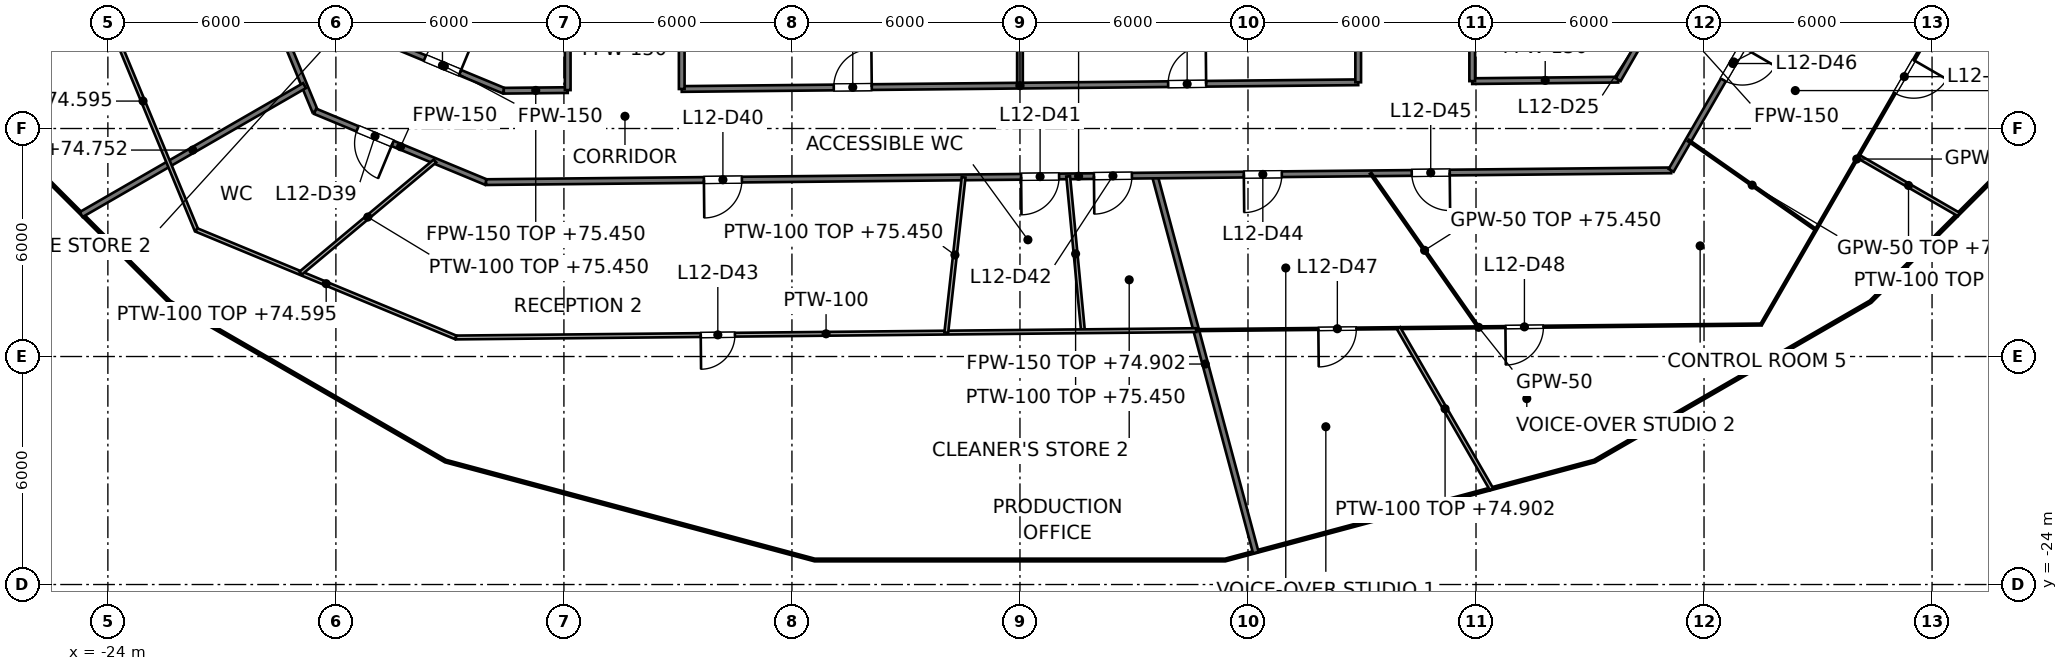
"""IFC4 building model, lengths in metres.
Left out: names, types, materials, properties, quantities, classifications, styles, units other than length and angle.
Written with IfcOpenShell. Run it as: python <this file> out.ifc"""

import sys

from ifc_helpers import new_model, si_unit, direction, frame, frame_2d, origin, place, context, subcontext, project, spatial, rectangle, extrude, element, fill, save


model = new_model("IFC4")
c1 = context("Model", 3, precision=1e-05, world=origin(), true_north=direction((0.0, 1.0)))
c2 = subcontext(c1, "Body", "Model", "MODEL_VIEW")
j1 = project(units=[si_unit("LENGTHUNIT", "METRE"), si_unit("PLANEANGLEUNIT", "RADIAN")], contexts=[c1])
p1 = place(None, origin())
s1 = spatial("IfcSite", under=j1, at=p1, CompositionType="ELEMENT")
p2 = place(p1, origin())
s2 = spatial("IfcBuilding", under=s1, at=p2, CompositionType="ELEMENT")
p3 = place(p2, frame((0.0, 0.0, 71.4)))
s3 = spatial("IfcBuildingStorey", under=s2, at=p3, CompositionType="ELEMENT", Elevation=71.4)
p4 = place(p3, frame((3.547, -13.236, 0.0), z_axis=(0.0, 0.0, 1.0), x_axis=(0.258783597602, -0.965935323721, 0.0)))
e1 = element("IfcWall", 1, at=p4, inside=s3, PredefinedType="PARTITIONING", context=c2, shape_type="SweptSolid", body=[
    extrude(rectangle(XDim=10.274, YDim=0.15, at=frame_2d((5.137, 0.0))), origin(), (0.0, 0.0, 1.0), 3.502),
])
p5 = place(p3, frame((-20.4, -7.075, 0.0), z_axis=(0.0, 0.0, 1.0), x_axis=(0.382745247328, -0.923853925492, 0.0)))
e2 = element("IfcWall", 2, at=p5, inside=s3, PredefinedType="PARTITIONING", context=c2, shape_type="SweptSolid", body=[
    extrude(rectangle(XDim=4.841, YDim=0.15, at=frame_2d((2.42, 0.0))), origin(), (0.0, 0.0, 1.0), 3.195),
])
p6 = place(p3, frame((-18.547, -11.547, 0.0), z_axis=(0.0, 0.0, 1.0), x_axis=(0.923816952651, -0.382834478587, 0.0)))
e3 = element("IfcWall", 3, at=p6, inside=s3, PredefinedType="PARTITIONING", context=c2, shape_type="SweptSolid", body=[
    extrude(rectangle(XDim=4.869, YDim=0.15, at=frame_2d((2.435, 0.0))), origin(), (0.0, 0.0, 1.0), 3.195),
])
p7 = place(p6, frame((1.207, 0.0, 0.0)))
e4 = element("IfcOpeningElement", 4, at=p7, cuts=e3, PredefinedType="OPENING", context=c2, shape_type="SweptSolid", body=[
    extrude(rectangle(XDim=1.0, YDim=2.1, at=frame_2d((0.5, 1.05))), frame((0.0, 0.075, 0.0), z_axis=(0.0, -1.0, 0.0), x_axis=(1.0, 0.0, 0.0)), (0.0, 0.0, 1.0), 0.15),
])
p8 = place(p3, frame((-16.71, -9.71, 0.0), z_axis=(0.0, 0.0, 1.0), x_axis=(0.923809320732, -0.382852894632, 0.0)))
e5 = element("IfcWall", 5, at=p8, inside=s3, PredefinedType="PARTITIONING", context=c2, shape_type="SweptSolid", body=[
    extrude(rectangle(XDim=3.385, YDim=0.15, at=frame_2d((1.692, 0.0))), origin(), (0.0, 0.0, 1.0), 3.195),
])
p9 = place(p8, frame((1.139, 0.0, 0.0)))
e6 = element("IfcOpeningElement", 6, at=p9, cuts=e5, PredefinedType="OPENING", context=c2, shape_type="SweptSolid", body=[
    extrude(rectangle(XDim=1.0, YDim=2.1, at=frame_2d((0.5, 1.05))), frame((0.0, 0.075, 0.0), z_axis=(0.0, -1.0, 0.0), x_axis=(1.0, 0.0, 0.0)), (0.0, 0.0, 1.0), 0.15),
])
p10 = place(p3, frame((-14.049, -13.411, 0.0), z_axis=(0.0, 0.0, 1.0), x_axis=(0.999950729089, 0.009926701045, 0.0)))
e7 = element("IfcWall", 7, at=p10, inside=s3, PredefinedType="PARTITIONING", context=c2, shape_type="SweptSolid", body=[
    extrude(rectangle(XDim=31.186, YDim=0.15, at=frame_2d((15.593, 0.0))), origin(), (0.0, 0.0, 1.0), 3.127),
])
p11 = place(p10, frame((5.733, 0.0, 0.0)))
e8 = element("IfcOpeningElement", 8, at=p11, cuts=e7, PredefinedType="OPENING", context=c2, shape_type="SweptSolid", body=[
    extrude(rectangle(XDim=1.0, YDim=2.1, at=frame_2d((0.5, 1.05))), frame((0.0, 0.075, 0.0), z_axis=(0.0, -1.0, 0.0), x_axis=(1.0, 0.0, 0.0)), (0.0, 0.0, 1.0), 0.15),
])
p12 = place(p10, frame((14.08, 0.0, 0.0)))
e9 = element("IfcOpeningElement", 9, at=p12, cuts=e7, PredefinedType="OPENING", context=c2, shape_type="SweptSolid", body=[
    extrude(rectangle(XDim=1.0, YDim=2.1, at=frame_2d((0.5, 1.05))), frame((0.0, 0.075, 0.0), z_axis=(0.0, -1.0, 0.0), x_axis=(1.0, 0.0, 0.0)), (0.0, 0.0, 1.0), 0.15),
])
p13 = place(p10, frame((15.996, 0.0, 0.0)))
e10 = element("IfcOpeningElement", 10, at=p13, cuts=e7, PredefinedType="OPENING", context=c2, shape_type="SweptSolid", body=[
    extrude(rectangle(XDim=1.0, YDim=2.1, at=frame_2d((0.5, 1.05))), frame((0.0, 0.075, 0.0), z_axis=(0.0, -1.0, 0.0), x_axis=(1.0, 0.0, 0.0)), (0.0, 0.0, 1.0), 0.15),
])
p14 = place(p10, frame((19.94, 0.0, 0.0)))
e11 = element("IfcOpeningElement", 11, at=p14, cuts=e7, PredefinedType="OPENING", context=c2, shape_type="SweptSolid", body=[
    extrude(rectangle(XDim=1.0, YDim=2.1, at=frame_2d((0.5, 1.05))), frame((0.0, 0.075, 0.0), z_axis=(0.0, -1.0, 0.0), x_axis=(1.0, 0.0, 0.0)), (0.0, 0.0, 1.0), 0.15),
])
p15 = place(p10, frame((24.359, 0.0, 0.0)))
e12 = element("IfcOpeningElement", 12, at=p15, cuts=e7, PredefinedType="OPENING", context=c2, shape_type="SweptSolid", body=[
    extrude(rectangle(XDim=1.0, YDim=2.1, at=frame_2d((0.5, 1.05))), frame((0.0, 0.075, 0.0), z_axis=(0.0, -1.0, 0.0), x_axis=(1.0, 0.0, 0.0)), (0.0, 0.0, 1.0), 0.15),
])
p16 = place(p3, frame((-13.583, -11.006, 0.0), z_axis=(0.0, 0.0, 1.0), x_axis=(0.999949916693, 0.010008201951, 0.0)))
e13 = element("IfcWall", 13, at=p16, inside=s3, PredefinedType="PARTITIONING", context=c2, shape_type="SweptSolid", body=[
    extrude(rectangle(XDim=1.683, YDim=0.15, at=frame_2d((0.842, 0.0))), origin(), (0.0, 0.0, 1.0), 4.05),
])
p17 = place(p3, frame((-8.9, -10.96, 0.0), z_axis=(0.0, 0.0, 1.0), x_axis=(0.999950697987, 0.009929833562, 0.0)))
e14 = element("IfcWall", 14, at=p17, inside=s3, PredefinedType="PARTITIONING", context=c2, shape_type="SweptSolid", body=[
    extrude(rectangle(XDim=17.801, YDim=0.15, at=frame_2d((8.9, 0.0))), origin(), (0.0, 0.0, 1.0), 3.127),
])
p18 = place(p17, frame((4.0, 0.0, 0.0)))
e15 = element("IfcOpeningElement", 15, at=p18, cuts=e14, PredefinedType="OPENING", context=c2, shape_type="SweptSolid", body=[
    extrude(rectangle(XDim=1.0, YDim=2.1, at=frame_2d((0.5, 1.05))), frame((0.0, 0.075, 0.0), z_axis=(0.0, -1.0, 0.0), x_axis=(1.0, 0.0, 0.0)), (0.0, 0.0, 1.0), 0.15),
])
p19 = place(p17, frame((12.8, 0.0, 0.0)))
e16 = element("IfcOpeningElement", 16, at=p19, cuts=e14, PredefinedType="OPENING", context=c2, shape_type="SweptSolid", body=[
    extrude(rectangle(XDim=1.0, YDim=2.1, at=frame_2d((0.5, 1.05))), frame((0.0, 0.075, 0.0), z_axis=(0.0, -1.0, 0.0), x_axis=(1.0, 0.0, 0.0)), (0.0, 0.0, 1.0), 0.15),
])
p20 = place(p3, frame((11.9, -10.753, 0.0), z_axis=(0.0, 0.0, 1.0), x_axis=(0.999950870391, 0.009912456998, 0.0)))
e17 = element("IfcWall", 17, at=p20, inside=s3, PredefinedType="PARTITIONING", context=c2, shape_type="SweptSolid", body=[
    extrude(rectangle(XDim=3.842, YDim=0.15, at=frame_2d((1.921, 0.0))), origin(), (0.0, 0.0, 1.0), 3.195),
])
p21 = place(p3, frame((-24.703, -14.263, 0.0), z_axis=(0.0, 0.0, 1.0), x_axis=(0.866084930914, 0.499896881811, 0.0)))
e18 = element("IfcWall", 18, at=p21, inside=s3, PredefinedType="PARTITIONING", context=c2, shape_type="SweptSolid", body=[
    extrude(rectangle(XDim=6.785, YDim=0.15, at=frame_2d((3.393, 0.0))), origin(), (0.0, 0.0, 1.0), 3.352),
])
p22 = place(p3, frame((17.135, -13.101, 0.0), z_axis=(0.0, 0.0, 1.0), x_axis=(0.499944832242, 0.866057252562, 0.0)))
e19 = element("IfcWall", 19, at=p22, inside=s3, PredefinedType="PARTITIONING", context=c2, shape_type="SweptSolid", body=[
    extrude(rectangle(XDim=6.589, YDim=0.15, at=frame_2d((3.294, 0.0))), origin(), (0.0, 0.0, 1.0), 3.195),
])
p23 = place(p22, frame((2.746, 0.0, 0.0)))
e20 = element("IfcOpeningElement", 20, at=p23, cuts=e19, PredefinedType="OPENING", context=c2, shape_type="SweptSolid", body=[
    extrude(rectangle(XDim=1.0, YDim=2.1, at=frame_2d((0.5, 1.05))), frame((0.0, 0.075, 0.0), z_axis=(0.0, -1.0, 0.0), x_axis=(1.0, 0.0, 0.0)), (0.0, 0.0, 1.0), 0.15),
])
p24 = place(p3, frame((15.742, -10.715, 0.0), z_axis=(0.0, 0.0, 1.0), x_axis=(0.499965549051, 0.866045293135, 0.0)))
e21 = element("IfcWall", 21, at=p24, inside=s3, PredefinedType="PARTITIONING", context=c2, shape_type="SweptSolid", body=[
    extrude(rectangle(XDim=4.55, YDim=0.15, at=frame_2d((2.275, 0.0))), origin(), (0.0, 0.0, 1.0), 3.195),
])
p25 = place(p24, frame((1.728, 0.0, 0.0)))
e22 = element("IfcOpeningElement", 22, at=p25, cuts=e21, PredefinedType="OPENING", context=c2, shape_type="SweptSolid", body=[
    extrude(rectangle(XDim=1.0, YDim=2.1, at=frame_2d((0.5, 1.05))), frame((0.0, 0.075, 0.0), z_axis=(0.0, -1.0, 0.0), x_axis=(1.0, 0.0, 0.0)), (0.0, 0.0, 1.0), 0.15),
])
p26 = place(p3, frame((11.9, -10.753, 0.0), z_axis=(0.0, 0.0, 1.0), x_axis=(0.0, 1.0, 0.0)))
e23 = element("IfcWall", 23, at=p26, inside=s3, PredefinedType="PARTITIONING", context=c2, shape_type="SweptSolid", body=[
    extrude(rectangle(XDim=2.753, YDim=0.15, at=frame_2d((1.376, 0.0))), origin(), (0.0, 0.0, 1.0), 3.195),
])
p27 = place(p3, frame((8.9, -10.783, 0.0), z_axis=(0.0, 0.0, 1.0), x_axis=(0.0, 1.0, 0.0)))
e24 = element("IfcWall", 24, at=p27, inside=s3, PredefinedType="PARTITIONING", context=c2, shape_type="SweptSolid", body=[
    extrude(rectangle(XDim=2.783, YDim=0.15, at=frame_2d((1.392, 0.0))), origin(), (0.0, 0.0, 1.0), 3.195),
])
p28 = place(p3, frame((0.0, -10.872, 0.0), z_axis=(0.0, 0.0, 1.0), x_axis=(0.0, 1.0, 0.0)))
e25 = element("IfcWall", 25, at=p28, inside=s3, PredefinedType="PARTITIONING", context=c2, shape_type="SweptSolid", body=[
    extrude(rectangle(XDim=2.872, YDim=0.15, at=frame_2d((1.436, 0.0))), origin(), (0.0, 0.0, 1.0), 3.195),
])
p29 = place(p3, frame((-8.9, -10.96, 0.0), z_axis=(0.0, 0.0, 1.0), x_axis=(0.0, 1.0, 0.0)))
e26 = element("IfcWall", 26, at=p29, inside=s3, PredefinedType="PARTITIONING", context=c2, shape_type="SweptSolid", body=[
    extrude(rectangle(XDim=2.96, YDim=0.15, at=frame_2d((1.48, 0.0))), origin(), (0.0, 0.0, 1.0), 3.195),
])
p30 = place(p3, frame((-11.9, -10.989, 0.0), z_axis=(0.0, 0.0, 1.0), x_axis=(0.0, 1.0, 0.0)))
e27 = element("IfcWall", 27, at=p30, inside=s3, PredefinedType="PARTITIONING", context=c2, shape_type="SweptSolid", body=[
    extrude(rectangle(XDim=2.989, YDim=0.15, at=frame_2d((1.495, 0.0))), origin(), (0.0, 0.0, 1.0), 3.195),
])
p31 = place(p3, frame((9.228, -13.18, 0.0), z_axis=(0.0, 0.0, 1.0), x_axis=(0.57366437087, -0.819090464842, 0.0)))
e28 = element("IfcWall", 28, at=p31, inside=s3, PredefinedType="PARTITIONING", context=c2, shape_type="SweptSolid", body=[
    extrude(rectangle(XDim=4.947, YDim=0.05, at=frame_2d((2.474, 0.0))), origin(), (0.0, 0.0, 1.0), 4.05),
])
p32 = place(p3, frame((17.589, -12.315, 0.0), z_axis=(0.0, 0.0, 1.0), x_axis=(0.819047072593, -0.57372632228, 0.0)))
e29 = element("IfcWall", 29, at=p32, inside=s3, PredefinedType="PARTITIONING", context=c2, shape_type="SweptSolid", body=[
    extrude(rectangle(XDim=4.096, YDim=0.05, at=frame_2d((2.048, 0.0))), origin(), (0.0, 0.0, 1.0), 4.05),
])
p33 = place(p3, frame((4.637, -17.306, 0.0), z_axis=(0.0, 0.0, 1.0), x_axis=(0.999950486945, 0.009951063225, 0.0)))
e30 = element("IfcWall", 30, at=p33, inside=s3, PredefinedType="PARTITIONING", context=c2, shape_type="SweptSolid", body=[
    extrude(rectangle(XDim=14.868, YDim=0.05, at=frame_2d((7.434, 0.0))), origin(), (0.0, 0.0, 1.0), 3.127),
])
p34 = place(p33, frame((3.215, 0.0, 0.0)))
e31 = element("IfcOpeningElement", 31, at=p34, cuts=e30, PredefinedType="OPENING", context=c2, shape_type="SweptSolid", body=[
    extrude(rectangle(XDim=1.0, YDim=2.1, at=frame_2d((0.5, 1.05))), frame((0.0, 0.025, 0.0), z_axis=(0.0, -1.0, 0.0), x_axis=(1.0, 0.0, 0.0)), (0.0, 0.0, 1.0), 0.05),
])
p35 = place(p33, frame((8.137, 0.0, 0.0)))
e32 = element("IfcOpeningElement", 32, at=p35, cuts=e30, PredefinedType="OPENING", context=c2, shape_type="SweptSolid", body=[
    extrude(rectangle(XDim=1.0, YDim=2.1, at=frame_2d((0.5, 1.05))), frame((0.0, 0.025, 0.0), z_axis=(0.0, -1.0, 0.0), x_axis=(1.0, 0.0, 0.0)), (0.0, 0.0, 1.0), 0.05),
])
p36 = place(p3, frame((19.504, -17.158, 0.0), z_axis=(0.0, 0.0, 1.0), x_axis=(0.500068479539, 0.865985863494, 0.0)))
e33 = element("IfcWall", 33, at=p36, inside=s3, PredefinedType="PARTITIONING", context=c2, shape_type="SweptSolid", body=[
    extrude(rectangle(XDim=10.057, YDim=0.05, at=frame_2d((5.028, 0.0))), origin(), (0.0, 0.0, 1.0), 3.195),
])
p37 = place(p36, frame((7.032, 0.0, 0.0)))
e34 = element("IfcOpeningElement", 34, at=p37, cuts=e33, PredefinedType="OPENING", context=c2, shape_type="SweptSolid", body=[
    extrude(rectangle(XDim=1.0, YDim=2.1, at=frame_2d((0.5, 1.05))), frame((0.0, 0.025, 0.0), z_axis=(0.0, -1.0, 0.0), x_axis=(1.0, 0.0, 0.0)), (0.0, 0.0, 1.0), 0.05),
])
p38 = place(p3, frame((1.269, -13.259, 0.0), z_axis=(0.0, 0.0, 1.0), x_axis=(0.095200112208, -0.99545815514, 0.0)))
e35 = element("IfcWall", 35, at=p38, inside=s3, PredefinedType="PARTITIONING", context=c2, shape_type="SweptSolid", body=[
    extrude(rectangle(XDim=4.095, YDim=0.1, at=frame_2d((2.048, 0.0))), origin(), (0.0, 0.0, 1.0), 4.05),
])
p39 = place(p3, frame((-24.48, -7.887, 0.0), z_axis=(0.0, 0.0, 1.0), x_axis=(0.382715997849, -0.923866042774, 0.0)))
e36 = element("IfcWall", 36, at=p39, inside=s3, PredefinedType="PARTITIONING", context=c2, shape_type="SweptSolid", body=[
    extrude(rectangle(XDim=7.341, YDim=0.1, at=frame_2d((3.67, 0.0))), origin(), (0.0, 0.0, 1.0), 3.195),
])
p40 = place(p3, frame((9.961, -17.253, 0.0), z_axis=(0.0, 0.0, 1.0), x_axis=(0.499938082639, -0.866061148838, 0.0)))
e37 = element("IfcWall", 37, at=p40, inside=s3, PredefinedType="PARTITIONING", context=c2, shape_type="SweptSolid", body=[
    extrude(rectangle(XDim=4.9, YDim=0.1, at=frame_2d((2.45, 0.0))), origin(), (0.0, 0.0, 1.0), 3.502),
])
p41 = place(p3, frame((22.058, -12.735, 0.0), z_axis=(0.0, 0.0, 1.0), x_axis=(0.866011219312, -0.500024567422, 0.0)))
e38 = element("IfcWall", 38, at=p41, inside=s3, PredefinedType="PARTITIONING", context=c2, shape_type="SweptSolid", body=[
    extrude(rectangle(XDim=3.054, YDim=0.1, at=frame_2d((1.527, 0.0))), origin(), (0.0, 0.0, 1.0), 3.352),
])
p42 = place(p3, frame((-21.67, -14.669, 0.0), z_axis=(0.0, 0.0, 1.0), x_axis=(0.923809076309, -0.382853484415, 0.0)))
e39 = element("IfcWall", 39, at=p42, inside=s3, PredefinedType="PARTITIONING", context=c2, shape_type="SweptSolid", body=[
    extrude(rectangle(XDim=7.392, YDim=0.1, at=frame_2d((3.696, 0.0))), origin(), (0.0, 0.0, 1.0), 3.195),
])
p43 = place(p3, frame((-14.841, -17.499, 0.0), z_axis=(0.0, 0.0, 1.0), x_axis=(0.999950730469, 0.009926562113, 0.0)))
e40 = element("IfcWall", 40, at=p43, inside=s3, PredefinedType="PARTITIONING", context=c2, shape_type="SweptSolid", body=[
    extrude(rectangle(XDim=19.479, YDim=0.1, at=frame_2d((9.74, 0.0))), origin(), (0.0, 0.0, 1.0), 3.127),
])
p44 = place(p43, frame((6.441, 0.0, 0.0)))
e41 = element("IfcOpeningElement", 41, at=p44, cuts=e40, PredefinedType="OPENING", context=c2, shape_type="SweptSolid", body=[
    extrude(rectangle(XDim=0.9, YDim=2.1, at=frame_2d((0.45, 1.05))), frame((0.0, 0.05, 0.0), z_axis=(0.0, -1.0, 0.0), x_axis=(1.0, 0.0, 0.0)), (0.0, 0.0, 1.0), 0.1),
])
p45 = place(p3, frame((-18.927, -15.806, 0.0), z_axis=(0.0, 0.0, 1.0), x_axis=(0.767477600109, 0.641075762551, 0.0)))
e42 = element("IfcWall", 42, at=p45, inside=s3, PredefinedType="PARTITIONING", context=c2, shape_type="SweptSolid", body=[
    extrude(rectangle(XDim=4.604, YDim=0.1, at=frame_2d((2.302, 0.0))), origin(), (0.0, 0.0, 1.0), 4.05),
])
p46 = place(p3, frame((-1.939, -17.371, 0.0), z_axis=(0.0, 0.0, 1.0), x_axis=(0.110946493735, 0.993826380978, 0.0)))
e43 = element("IfcWall", 43, at=p46, inside=s3, PredefinedType="PARTITIONING", context=c2, shape_type="SweptSolid", body=[
    extrude(rectangle(XDim=4.111, YDim=0.1, at=frame_2d((2.055, 0.0))), origin(), (0.0, 0.0, 1.0), 4.05),
])
p47 = place(p18, origin())
e44 = element("IfcDoor", 44, at=p47, inside=s3, OperationType="SINGLE_SWING_RIGHT", PredefinedType="DOOR", context=c2, shape_type="SweptSolid", body=[
    extrude(rectangle(XDim=1.0, YDim=2.1, at=frame_2d((0.5, 1.05))), frame((0.0, 0.025, 0.0), z_axis=(0.0, -1.0, 0.0), x_axis=(1.0, 0.0, 0.0)), (0.0, 0.0, 1.0), 0.05),
])
fill(e15, e44)
p48 = place(p19, origin())
e45 = element("IfcDoor", 45, at=p48, inside=s3, OperationType="SINGLE_SWING_RIGHT", PredefinedType="DOOR", context=c2, shape_type="SweptSolid", body=[
    extrude(rectangle(XDim=1.0, YDim=2.1, at=frame_2d((0.5, 1.05))), frame((0.0, 0.025, 0.0), z_axis=(0.0, -1.0, 0.0), x_axis=(1.0, 0.0, 0.0)), (0.0, 0.0, 1.0), 0.05),
])
fill(e16, e45)
p49 = place(p9, origin())
e46 = element("IfcDoor", 46, at=p49, inside=s3, OperationType="SINGLE_SWING_RIGHT", PredefinedType="DOOR", context=c2, shape_type="SweptSolid", body=[
    extrude(rectangle(XDim=1.0, YDim=2.1, at=frame_2d((0.5, 1.05))), frame((0.0, 0.025, 0.0), z_axis=(0.0, -1.0, 0.0), x_axis=(1.0, 0.0, 0.0)), (0.0, 0.0, 1.0), 0.05),
])
fill(e6, e46)
p50 = place(p7, origin())
e47 = element("IfcDoor", 47, at=p50, inside=s3, OperationType="SINGLE_SWING_RIGHT", PredefinedType="DOOR", context=c2, shape_type="SweptSolid", body=[
    extrude(rectangle(XDim=1.0, YDim=2.1, at=frame_2d((0.5, 1.05))), frame((0.0, 0.025, 0.0), z_axis=(0.0, -1.0, 0.0), x_axis=(1.0, 0.0, 0.0)), (0.0, 0.0, 1.0), 0.05),
])
fill(e4, e47)
p51 = place(p11, origin())
e48 = element("IfcDoor", 48, at=p51, inside=s3, OperationType="SINGLE_SWING_LEFT", PredefinedType="DOOR", context=c2, shape_type="SweptSolid", body=[
    extrude(rectangle(XDim=1.0, YDim=2.1, at=frame_2d((0.5, 1.05))), frame((0.0, 0.025, 0.0), z_axis=(0.0, -1.0, 0.0), x_axis=(1.0, 0.0, 0.0)), (0.0, 0.0, 1.0), 0.05),
])
fill(e8, e48)
p52 = place(p12, origin())
e49 = element("IfcDoor", 49, at=p52, inside=s3, OperationType="SINGLE_SWING_LEFT", PredefinedType="DOOR", context=c2, shape_type="SweptSolid", body=[
    extrude(rectangle(XDim=1.0, YDim=2.1, at=frame_2d((0.5, 1.05))), frame((0.0, 0.025, 0.0), z_axis=(0.0, -1.0, 0.0), x_axis=(1.0, 0.0, 0.0)), (0.0, 0.0, 1.0), 0.05),
])
fill(e9, e49)
p53 = place(p13, origin())
e50 = element("IfcDoor", 50, at=p53, inside=s3, OperationType="SINGLE_SWING_LEFT", PredefinedType="DOOR", context=c2, shape_type="SweptSolid", body=[
    extrude(rectangle(XDim=1.0, YDim=2.1, at=frame_2d((0.5, 1.05))), frame((0.0, 0.025, 0.0), z_axis=(0.0, -1.0, 0.0), x_axis=(1.0, 0.0, 0.0)), (0.0, 0.0, 1.0), 0.05),
])
fill(e10, e50)
p54 = place(p44, origin())
e51 = element("IfcDoor", 51, at=p54, inside=s3, OperationType="SINGLE_SWING_LEFT", PredefinedType="DOOR", context=c2, shape_type="SweptSolid", body=[
    extrude(rectangle(XDim=0.9, YDim=2.1, at=frame_2d((0.45, 1.05))), frame((0.0, 0.025, 0.0), z_axis=(0.0, -1.0, 0.0), x_axis=(1.0, 0.0, 0.0)), (0.0, 0.0, 1.0), 0.05),
])
fill(e41, e51)
p55 = place(p14, origin())
e52 = element("IfcDoor", 52, at=p55, inside=s3, OperationType="SINGLE_SWING_LEFT", PredefinedType="DOOR", context=c2, shape_type="SweptSolid", body=[
    extrude(rectangle(XDim=1.0, YDim=2.1, at=frame_2d((0.5, 1.05))), frame((0.0, 0.025, 0.0), z_axis=(0.0, -1.0, 0.0), x_axis=(1.0, 0.0, 0.0)), (0.0, 0.0, 1.0), 0.05),
])
fill(e11, e52)
p56 = place(p15, origin())
e53 = element("IfcDoor", 53, at=p56, inside=s3, OperationType="SINGLE_SWING_RIGHT", PredefinedType="DOOR", context=c2, shape_type="SweptSolid", body=[
    extrude(rectangle(XDim=1.0, YDim=2.1, at=frame_2d((0.5, 1.05))), frame((0.0, 0.025, 0.0), z_axis=(0.0, -1.0, 0.0), x_axis=(1.0, 0.0, 0.0)), (0.0, 0.0, 1.0), 0.05),
])
fill(e12, e53)
p57 = place(p23, origin())
e54 = element("IfcDoor", 54, at=p57, inside=s3, OperationType="SINGLE_SWING_RIGHT", PredefinedType="DOOR", context=c2, shape_type="SweptSolid", body=[
    extrude(rectangle(XDim=1.0, YDim=2.1, at=frame_2d((0.5, 1.05))), frame((0.0, 0.025, 0.0), z_axis=(0.0, -1.0, 0.0), x_axis=(1.0, 0.0, 0.0)), (0.0, 0.0, 1.0), 0.05),
])
fill(e20, e54)
p58 = place(p34, origin())
e55 = element("IfcDoor", 55, at=p58, inside=s3, OperationType="SINGLE_SWING_LEFT", PredefinedType="DOOR", context=c2, shape_type="SweptSolid", body=[
    extrude(rectangle(XDim=1.0, YDim=2.1, at=frame_2d((0.5, 1.05))), frame((0.0, 0.025, 0.0), z_axis=(0.0, -1.0, 0.0), x_axis=(1.0, 0.0, 0.0)), (0.0, 0.0, 1.0), 0.05),
])
fill(e31, e55)
p59 = place(p35, origin())
e56 = element("IfcDoor", 56, at=p59, inside=s3, OperationType="SINGLE_SWING_LEFT", PredefinedType="DOOR", context=c2, shape_type="SweptSolid", body=[
    extrude(rectangle(XDim=1.0, YDim=2.1, at=frame_2d((0.5, 1.05))), frame((0.0, 0.025, 0.0), z_axis=(0.0, -1.0, 0.0), x_axis=(1.0, 0.0, 0.0)), (0.0, 0.0, 1.0), 0.05),
])
fill(e32, e56)
p60 = place(p37, origin())
e57 = element("IfcDoor", 57, at=p60, inside=s3, OperationType="SINGLE_SWING_RIGHT", PredefinedType="DOOR", context=c2, shape_type="SweptSolid", body=[
    extrude(rectangle(XDim=1.0, YDim=2.1, at=frame_2d((0.5, 1.05))), frame((0.0, 0.025, 0.0), z_axis=(0.0, -1.0, 0.0), x_axis=(1.0, 0.0, 0.0)), (0.0, 0.0, 1.0), 0.05),
])
fill(e34, e57)
save(model, sys.argv[1])
